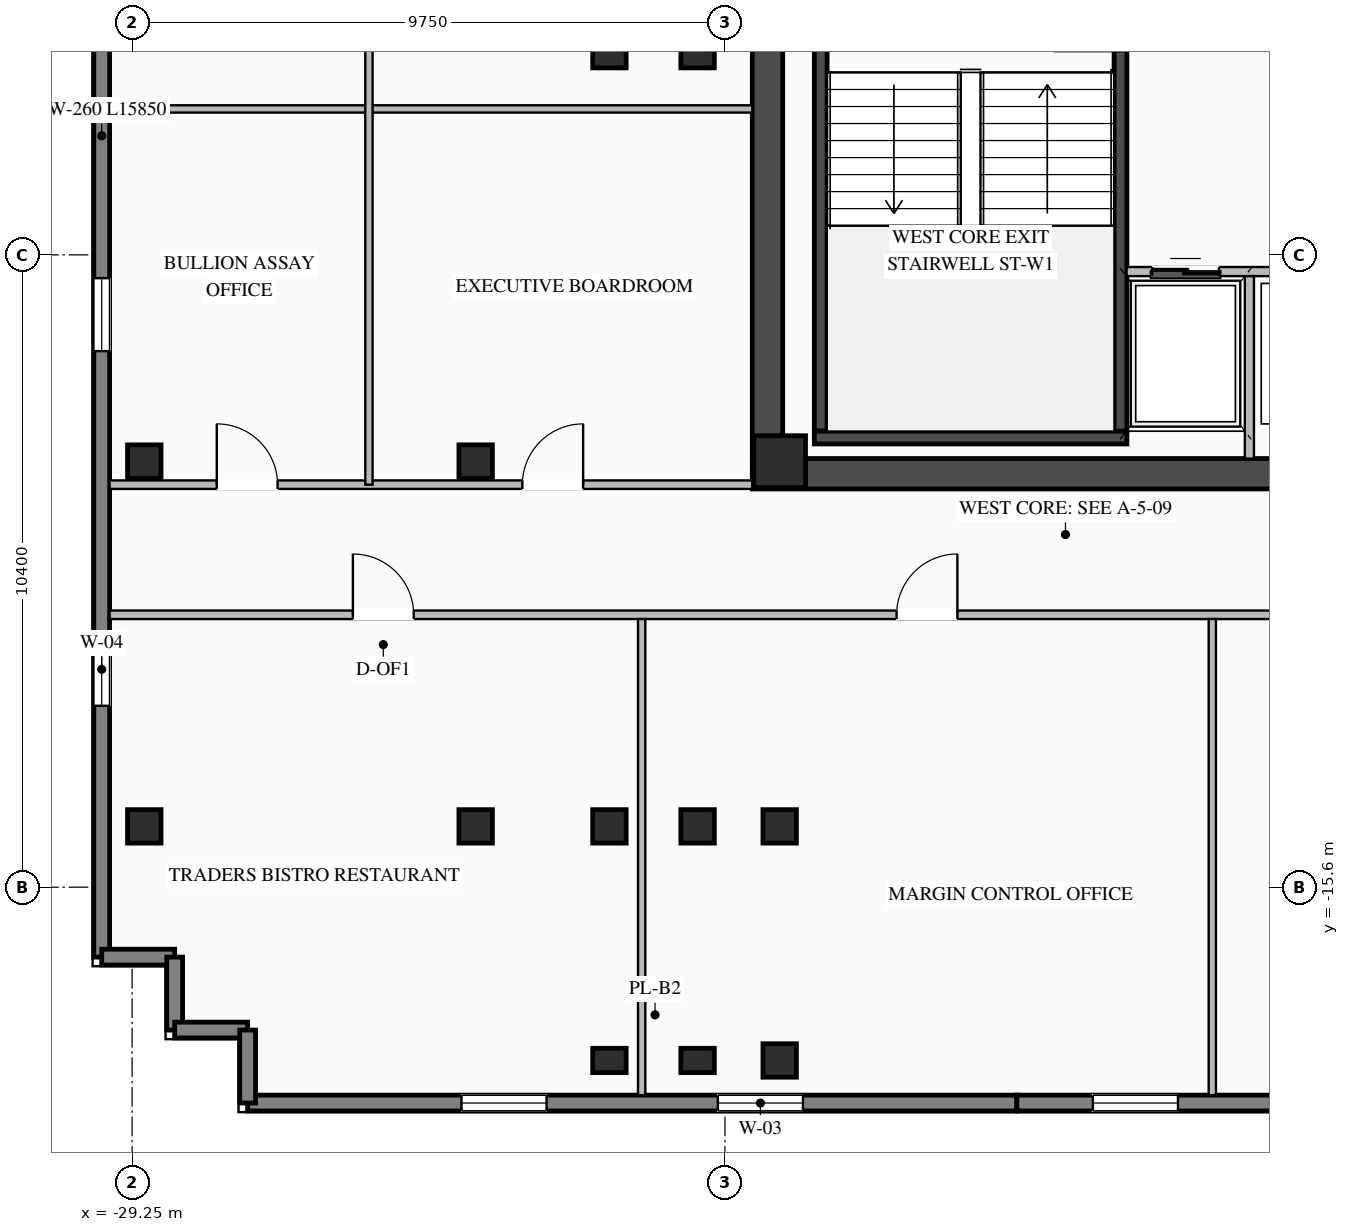
"""IFC4 building model, lengths in metres.
Left out: names, types, materials, properties, quantities, classifications, styles, units other than length and angle.
Written with IfcOpenShell. Run it as: python <this file> out.ifc"""

import sys

from ifc_helpers import new_model, si_unit, direction, frame, frame_2d, origin, origin_2d, place, context, subcontext, project, spatial, rectangle, i_section, extrude, element, fill, save


model = new_model("IFC4")
c1 = context("Model", 3, precision=1e-05, world=origin(), true_north=direction((0.0, 1.0)))
c2 = subcontext(c1, "Body", "Model", "MODEL_VIEW")
j1 = project(units=[si_unit("LENGTHUNIT", "METRE"), si_unit("PLANEANGLEUNIT", "RADIAN")], contexts=[c1])
p1 = place(None, origin())
s1 = spatial("IfcSite", under=j1, at=p1, CompositionType="ELEMENT")
p2 = place(p1, origin())
s2 = spatial("IfcBuilding", under=s1, at=p2, CompositionType="ELEMENT")
p3 = place(p2, frame((0.0, 0.0, 218.85)))
s3 = spatial("IfcBuildingStorey", under=s2, at=p3, CompositionType="ELEMENT", Elevation=218.85)
p4 = place(p3, frame((-19.05, -8.8, 0.0), z_axis=(0.0, 0.0, 1.0), x_axis=(1.0, 0.0, 0.0)))
e1 = element("IfcWall", 1, at=p4, inside=s3, PredefinedType="SHEAR", context=c2, shape_type="SweptSolid", body=[
    extrude(rectangle(XDim=10.25, YDim=0.5, at=frame_2d((5.125, 0.0))), origin(), (0.0, 0.0, 1.0), 3.27),
])
p5 = place(p3, frame((-18.8, -8.55, 0.0), z_axis=(0.0, 0.0, 1.0), x_axis=(0.0, 1.0, 0.0)))
e2 = element("IfcWall", 2, at=p5, inside=s3, PredefinedType="SHEAR", context=c2, shape_type="SweptSolid", body=[
    extrude(rectangle(XDim=17.1, YDim=0.5, at=frame_2d((8.55, 0.0))), origin(), (0.0, 0.0, 1.0), 3.27),
])
p6 = place(p3, frame((-12.995, -8.1, 0.0), z_axis=(0.0, 0.0, 1.0), x_axis=(0.0, 1.0, 0.0)))
e3 = element("IfcWall", 3, at=p6, inside=s3, PredefinedType="SHEAR", context=c2, shape_type="SweptSolid", body=[
    extrude(rectangle(XDim=8.2, YDim=0.21, at=frame_2d((4.1, 0.0))), origin(), (0.0, 0.0, 1.0), 3.27),
])
p7 = place(p6, frame((6.25, 0.0, 0.0)))
e4 = element("IfcOpeningElement", 4, at=p7, cuts=e3, PredefinedType="OPENING", context=c2, shape_type="SweptSolid", body=[
    extrude(rectangle(XDim=1.1, YDim=2.15, at=frame_2d((0.55, 1.075))), frame((0.0, 0.115, 0.0), z_axis=(0.0, -1.0, 0.0), x_axis=(1.0, 0.0, 0.0)), (0.0, 0.0, 1.0), 0.23),
])
p8 = place(p3, frame((-17.925, -8.1, 0.0), z_axis=(0.0, 0.0, 1.0), x_axis=(0.0, 1.0, 0.0)))
e5 = element("IfcWall", 5, at=p8, inside=s3, PredefinedType="SHEAR", context=c2, shape_type="SweptSolid", body=[
    extrude(rectangle(XDim=8.2, YDim=0.21, at=frame_2d((4.1, 0.0))), origin(), (0.0, 0.0, 1.0), 3.27),
])
p9 = place(p3, frame((-18.03, -8.205, 0.0), z_axis=(0.0, 0.0, 1.0), x_axis=(1.0, 0.0, 0.0)))
e6 = element("IfcWall", 6, at=p9, inside=s3, PredefinedType="SHEAR", context=c2, shape_type="SweptSolid", body=[
    extrude(rectangle(XDim=5.14, YDim=0.21, at=frame_2d((2.57, 0.0))), origin(), (0.0, 0.0, 1.0), 3.27),
])
p10 = place(p3, frame((-18.6, -8.6, 0.0), z_axis=(0.0, 0.0, 1.0), x_axis=(1.0, 0.0, 0.0)))
e7 = element("IfcColumn", 7, at=p10, inside=s3, PredefinedType="COLUMN", context=c2, shape_type="SweptSolid", body=[
    extrude(rectangle(XDim=0.85, YDim=0.85, at=origin_2d()), origin(), (0.0, 0.0, 1.0), 3.45),
])
for number, where, z_axis, x_axis in (
    (8, (-21.4, -14.6, 0.0), (0.0, 0.0, 1.0), (1.0, 0.0, 0.0)),
    (9, (-19.95, -14.6, 0.0), (0.0, 0.0, 1.0), (1.0, 0.0, 0.0)),
    (10, (-18.6, -14.6, 0.0), (0.0, 0.0, 1.0), (1.0, 0.0, 0.0)),
    (11, (-21.4, -1.85, 0.0), (0.0, 0.0, 1.0), (1.0, 0.0, 0.0)),
    (12, (-19.95, -1.85, 0.0), (0.0, 0.0, 1.0), (1.0, 0.0, 0.0)),
    (13, (-23.6, -14.6, 0.0), (0.0, 0.0, 1.0), (1.0, 0.0, 0.0)),
    (14, (-23.6, -8.6, 0.0), (0.0, 0.0, 1.0), (1.0, 0.0, 0.0)),
    (15, (-18.6, -18.45, 0.0), (0.0, 0.0, 1.0), (1.0, 0.0, 0.0)),
    (16, (-29.05, -14.6, 0.0), (0.0, 0.0, 1.0), (1.0, 0.0, 0.0)),
    (17, (-29.05, -8.6, 0.0), (0.0, 0.0, 1.0), (1.0, 0.0, 0.0)),
):
    element("IfcColumn", number, at=place(p3, frame(where, z_axis=z_axis, x_axis=x_axis)), inside=s3, PredefinedType="COLUMN", context=c2, shape_type="SweptSolid", body=[
        extrude(i_section(OverallWidth=0.55, OverallDepth=0.55, WebThickness=0.024, FlangeThickness=0.036, at=origin_2d()), origin(), (0.0, 0.0, 1.0), 3.45),
    ])
for number, where, z_axis, x_axis in (
    (18, (-21.4, -18.45, 0.0), (0.0, 0.0, 1.0), (1.0, 0.0, 0.0)),
    (19, (-19.95, -18.45, 0.0), (0.0, 0.0, 1.0), (1.0, 0.0, 0.0)),
):
    element("IfcColumn", number, at=place(p3, frame(where, z_axis=z_axis, x_axis=x_axis)), inside=s3, PredefinedType="PILASTER", context=c2, shape_type="SweptSolid", body=[
        extrude(rectangle(XDim=0.55, YDim=0.4, at=origin_2d()), origin(), (0.0, 0.0, 1.0), 3.45),
    ])
p11 = place(p3, frame((-14.7, -19.15, 0.0), z_axis=(0.0, 0.0, 1.0), x_axis=(-1.0, 0.0, 0.0)))
e20 = element("IfcWall", 20, at=p11, inside=s3, PredefinedType="STANDARD", context=c2, shape_type="SweptSolid", body=[
    extrude(rectangle(XDim=12.65, YDim=0.26, at=frame_2d((6.325, 0.0))), origin(), (0.0, 0.0, 1.0), 3.25),
])
p12 = place(p11, frame((3.517, 0.0, 0.76)))
e21 = element("IfcOpeningElement", 21, at=p12, cuts=e20, PredefinedType="OPENING", context=c2, shape_type="SweptSolid", body=[
    extrude(rectangle(XDim=1.4, YDim=1.95, at=frame_2d((0.7, 0.975))), frame((0.0, 0.14, 0.0), z_axis=(0.0, -1.0, 0.0), x_axis=(1.0, 0.0, 0.0)), (0.0, 0.0, 1.0), 0.28),
])
p13 = place(p11, frame((7.733, 0.0, 0.76)))
e22 = element("IfcOpeningElement", 22, at=p13, cuts=e20, PredefinedType="OPENING", context=c2, shape_type="SweptSolid", body=[
    extrude(rectangle(XDim=1.4, YDim=1.95, at=frame_2d((0.7, 0.975))), frame((0.0, 0.14, 0.0), z_axis=(0.0, -1.0, 0.0), x_axis=(1.0, 0.0, 0.0)), (0.0, 0.0, 1.0), 0.28),
])
p14 = place(p3, frame((-5.7, -19.15, 0.0), z_axis=(0.0, 0.0, 1.0), x_axis=(-1.0, 0.0, 0.0)))
e23 = element("IfcWall", 23, at=p14, inside=s3, PredefinedType="STANDARD", context=c2, shape_type="SweptSolid", body=[
    extrude(rectangle(XDim=9.0, YDim=0.26, at=frame_2d((4.5, 0.0))), origin(), (0.0, 0.0, 1.0), 3.25),
])
p15 = place(p14, frame((2.3, 0.0, 0.76)))
e24 = element("IfcOpeningElement", 24, at=p15, cuts=e23, PredefinedType="OPENING", context=c2, shape_type="SweptSolid", body=[
    extrude(rectangle(XDim=1.4, YDim=1.95, at=frame_2d((0.7, 0.975))), frame((0.0, 0.14, 0.0), z_axis=(0.0, -1.0, 0.0), x_axis=(1.0, 0.0, 0.0)), (0.0, 0.0, 1.0), 0.28),
])
p16 = place(p14, frame((6.35, 0.0, 0.76)))
e25 = element("IfcOpeningElement", 25, at=p16, cuts=e23, PredefinedType="OPENING", context=c2, shape_type="SweptSolid", body=[
    extrude(rectangle(XDim=1.4, YDim=1.95, at=frame_2d((0.7, 0.975))), frame((0.0, 0.14, 0.0), z_axis=(0.0, -1.0, 0.0), x_axis=(1.0, 0.0, 0.0)), (0.0, 0.0, 1.0), 0.28),
])
p17 = place(p3, frame((-29.75, -16.75, 0.0), z_axis=(0.0, 0.0, 1.0), x_axis=(0.0, 1.0, 0.0)))
e26 = element("IfcWall", 26, at=p17, inside=s3, PredefinedType="STANDARD", context=c2, shape_type="SweptSolid", body=[
    extrude(rectangle(XDim=15.85, YDim=0.26, at=frame_2d((7.925, 0.0))), origin(), (0.0, 0.0, 1.0), 3.25),
])
p18 = place(p17, frame((4.133, 0.0, 0.76)))
e27 = element("IfcOpeningElement", 27, at=p18, cuts=e26, PredefinedType="OPENING", context=c2, shape_type="SweptSolid", body=[
    extrude(rectangle(XDim=1.2, YDim=1.95, at=frame_2d((0.6, 0.975))), frame((0.0, 0.14, 0.0), z_axis=(0.0, -1.0, 0.0), x_axis=(1.0, 0.0, 0.0)), (0.0, 0.0, 1.0), 0.28),
])
p19 = place(p17, frame((9.967, 0.0, 0.76)))
e28 = element("IfcOpeningElement", 28, at=p19, cuts=e26, PredefinedType="OPENING", context=c2, shape_type="SweptSolid", body=[
    extrude(rectangle(XDim=1.2, YDim=1.95, at=frame_2d((0.6, 0.975))), frame((0.0, 0.14, 0.0), z_axis=(0.0, -1.0, 0.0), x_axis=(1.0, 0.0, 0.0)), (0.0, 0.0, 1.0), 0.28),
])
for number, where, z_axis, x_axis in (
    (29, (-29.75, -16.75, 0.0), (0.0, 0.0, 1.0), (1.0, 0.0, 0.0)),
    (30, (-28.55, -16.75, 0.0), (0.0, 0.0, 1.0), (0.0, -1.0, 0.0)),
    (31, (-28.55, -17.95, 0.0), (0.0, 0.0, 1.0), (1.0, 0.0, 0.0)),
    (32, (-27.35, -17.95, 0.0), (0.0, 0.0, 1.0), (0.0, -1.0, 0.0)),
):
    element("IfcWall", number, at=place(p3, frame(where, z_axis=z_axis, x_axis=x_axis)), inside=s3, PredefinedType="STANDARD", context=c2, shape_type="SweptSolid", body=[
        extrude(rectangle(XDim=1.2, YDim=0.26, at=frame_2d((0.6, 0.0))), origin(), (0.0, 0.0, 1.0), 3.25),
    ])
p20 = place(p3, frame((-12.895, -5.475, 0.0), z_axis=(0.0, 0.0, 1.0), x_axis=(1.0, 0.0, 0.0)))
e33 = element("IfcWall", 33, at=p20, inside=s3, PredefinedType="STANDARD", context=c2, shape_type="SweptSolid", body=[
    extrude(rectangle(XDim=3.595, YDim=0.15, at=frame_2d((1.797, 0.0))), origin(), (0.0, 0.0, 1.0), 3.25),
])
p21 = place(p20, frame((0.42, 0.0, 0.0)))
e34 = element("IfcOpeningElement", 34, at=p21, cuts=e33, PredefinedType="OPENING", context=c2, shape_type="SweptSolid", body=[
    extrude(rectangle(XDim=1.1, YDim=2.15, at=frame_2d((0.55, 1.075))), frame((0.0, 0.085, 0.0), z_axis=(0.0, -1.0, 0.0), x_axis=(1.0, 0.0, 0.0)), (0.0, 0.0, 1.0), 0.17),
])
p22 = place(p20, frame((2.37, 0.0, 0.0)))
e35 = element("IfcOpeningElement", 35, at=p22, cuts=e33, PredefinedType="OPENING", context=c2, shape_type="SweptSolid", body=[
    extrude(rectangle(XDim=0.75, YDim=2.05, at=frame_2d((0.375, 1.025))), frame((0.0, 0.085, 0.0), z_axis=(0.0, -1.0, 0.0), x_axis=(1.0, 0.0, 0.0)), (0.0, 0.0, 1.0), 0.17),
])
p23 = place(p3, frame((-10.875, -8.55, 0.0), z_axis=(0.0, 0.0, 1.0), x_axis=(0.0, 1.0, 0.0)))
e36 = element("IfcWall", 36, at=p23, inside=s3, PredefinedType="STANDARD", context=c2, shape_type="SweptSolid", body=[
    extrude(rectangle(XDim=3.0, YDim=0.15, at=frame_2d((1.5, 0.0))), origin(), (0.0, 0.0, 1.0), 3.25),
])
p24 = place(p3, frame((-29.62, -11.12, 0.0), z_axis=(0.0, 0.0, 1.0), x_axis=(1.0, 0.0, 0.0)))
e37 = element("IfcWall", 37, at=p24, inside=s3, PredefinedType="STANDARD", context=c2, shape_type="SweptSolid", body=[
    extrude(rectangle(XDim=56.84, YDim=0.14, at=frame_2d((28.42, 0.0))), origin(), (0.0, 0.0, 1.0), 3.25),
])
p25 = place(p24, frame((36.11, 0.0, 0.0)))
e38 = element("IfcOpeningElement", 38, at=p25, cuts=e37, PredefinedType="OPENING", context=c2, shape_type="SweptSolid", body=[
    extrude(rectangle(XDim=0.92, YDim=2.08, at=frame_2d((0.46, 1.04))), frame((0.0, 0.08, 0.0), z_axis=(0.0, -1.0, 0.0), x_axis=(1.0, 0.0, 0.0)), (0.0, 0.0, 1.0), 0.16),
])
p26 = place(p24, frame((39.61, 0.0, 0.0)))
e39 = element("IfcOpeningElement", 39, at=p26, cuts=e37, PredefinedType="OPENING", context=c2, shape_type="SweptSolid", body=[
    extrude(rectangle(XDim=0.92, YDim=2.08, at=frame_2d((0.46, 1.04))), frame((0.0, 0.08, 0.0), z_axis=(0.0, -1.0, 0.0), x_axis=(1.0, 0.0, 0.0)), (0.0, 0.0, 1.0), 0.16),
])
p27 = place(p24, frame((42.46, 0.0, 0.0)))
e40 = element("IfcOpeningElement", 40, at=p27, cuts=e37, PredefinedType="OPENING", context=c2, shape_type="SweptSolid", body=[
    extrude(rectangle(XDim=0.92, YDim=2.08, at=frame_2d((0.46, 1.04))), frame((0.0, 0.08, 0.0), z_axis=(0.0, -1.0, 0.0), x_axis=(1.0, 0.0, 0.0)), (0.0, 0.0, 1.0), 0.16),
])
p28 = place(p24, frame((4.001, 0.0, 0.0)))
e41 = element("IfcOpeningElement", 41, at=p28, cuts=e37, PredefinedType="OPENING", context=c2, shape_type="SweptSolid", body=[
    extrude(rectangle(XDim=1.0, YDim=2.08, at=frame_2d((0.5, 1.04))), frame((0.0, 0.08, 0.0), z_axis=(0.0, -1.0, 0.0), x_axis=(1.0, 0.0, 0.0)), (0.0, 0.0, 1.0), 0.16),
])
p29 = place(p24, frame((12.942, 0.0, 0.0)))
e42 = element("IfcOpeningElement", 42, at=p29, cuts=e37, PredefinedType="OPENING", context=c2, shape_type="SweptSolid", body=[
    extrude(rectangle(XDim=1.0, YDim=2.08, at=frame_2d((0.5, 1.04))), frame((0.0, 0.08, 0.0), z_axis=(0.0, -1.0, 0.0), x_axis=(1.0, 0.0, 0.0)), (0.0, 0.0, 1.0), 0.16),
])
p30 = place(p24, frame((22.154, 0.0, 0.0)))
e43 = element("IfcOpeningElement", 43, at=p30, cuts=e37, PredefinedType="OPENING", context=c2, shape_type="SweptSolid", body=[
    extrude(rectangle(XDim=1.0, YDim=2.08, at=frame_2d((0.5, 1.04))), frame((0.0, 0.08, 0.0), z_axis=(0.0, -1.0, 0.0), x_axis=(1.0, 0.0, 0.0)), (0.0, 0.0, 1.0), 0.16),
])
p31 = place(p24, frame((30.497, 0.0, 0.0)))
e44 = element("IfcOpeningElement", 44, at=p31, cuts=e37, PredefinedType="OPENING", context=c2, shape_type="SweptSolid", body=[
    extrude(rectangle(XDim=1.0, YDim=2.08, at=frame_2d((0.5, 1.04))), frame((0.0, 0.08, 0.0), z_axis=(0.0, -1.0, 0.0), x_axis=(1.0, 0.0, 0.0)), (0.0, 0.0, 1.0), 0.16),
])
p32 = place(p24, frame((46.837, 0.0, 0.0)))
e45 = element("IfcOpeningElement", 45, at=p32, cuts=e37, PredefinedType="OPENING", context=c2, shape_type="SweptSolid", body=[
    extrude(rectangle(XDim=1.0, YDim=2.08, at=frame_2d((0.5, 1.04))), frame((0.0, 0.08, 0.0), z_axis=(0.0, -1.0, 0.0), x_axis=(1.0, 0.0, 0.0)), (0.0, 0.0, 1.0), 0.16),
])
p33 = place(p24, frame((53.122, 0.0, 0.0)))
e46 = element("IfcOpeningElement", 46, at=p33, cuts=e37, PredefinedType="OPENING", context=c2, shape_type="SweptSolid", body=[
    extrude(rectangle(XDim=1.0, YDim=2.08, at=frame_2d((0.5, 1.04))), frame((0.0, 0.08, 0.0), z_axis=(0.0, -1.0, 0.0), x_axis=(1.0, 0.0, 0.0)), (0.0, 0.0, 1.0), 0.16),
])
for number, where, z_axis, x_axis in (
    (47, (-20.87, -19.02, 0.0), (0.0, 0.0, 1.0), (0.0, 1.0, 0.0)),
    (48, (-11.485, -19.02, 0.0), (0.0, 0.0, 1.0), (0.0, 1.0, 0.0)),
):
    element("IfcWall", number, at=place(p3, frame(where, z_axis=z_axis, x_axis=x_axis)), inside=s3, PredefinedType="STANDARD", context=c2, shape_type="SweptSolid", body=[
        extrude(rectangle(XDim=7.83, YDim=0.12, at=frame_2d((3.915, 0.0))), origin(), (0.0, 0.0, 1.0), 3.25),
    ])
p34 = place(p3, frame((-29.62, -8.98, 0.0), z_axis=(0.0, 0.0, 1.0), x_axis=(1.0, 0.0, 0.0)))
e49 = element("IfcWall", 49, at=p34, inside=s3, PredefinedType="STANDARD", context=c2, shape_type="SweptSolid", body=[
    extrude(rectangle(XDim=10.57, YDim=0.14, at=frame_2d((5.285, 0.0))), origin(), (0.0, 0.0, 1.0), 3.25),
])
p35 = place(p34, frame((1.762, 0.0, 0.0)))
e50 = element("IfcOpeningElement", 50, at=p35, cuts=e49, PredefinedType="OPENING", context=c2, shape_type="SweptSolid", body=[
    extrude(rectangle(XDim=1.0, YDim=2.08, at=frame_2d((0.5, 1.04))), frame((0.0, 0.08, 0.0), z_axis=(0.0, -1.0, 0.0), x_axis=(1.0, 0.0, 0.0)), (0.0, 0.0, 1.0), 0.16),
])
p36 = place(p34, frame((6.788, 0.0, 0.0)))
e51 = element("IfcOpeningElement", 51, at=p36, cuts=e49, PredefinedType="OPENING", context=c2, shape_type="SweptSolid", body=[
    extrude(rectangle(XDim=1.0, YDim=2.08, at=frame_2d((0.5, 1.04))), frame((0.0, 0.08, 0.0), z_axis=(0.0, -1.0, 0.0), x_axis=(1.0, 0.0, 0.0)), (0.0, 0.0, 1.0), 0.16),
])
p37 = place(p3, frame((-29.62, -2.8, 0.0), z_axis=(0.0, 0.0, 1.0), x_axis=(1.0, 0.0, 0.0)))
e52 = element("IfcWall", 52, at=p37, inside=s3, PredefinedType="STANDARD", context=c2, shape_type="SweptSolid", body=[
    extrude(rectangle(XDim=10.57, YDim=0.12, at=frame_2d((5.285, 0.0))), origin(), (0.0, 0.0, 1.0), 3.25),
])
p38 = place(p3, frame((-25.355, -8.98, 0.0), z_axis=(0.0, 0.0, 1.0), x_axis=(0.0, 1.0, 0.0)))
e53 = element("IfcWall", 53, at=p38, inside=s3, PredefinedType="STANDARD", context=c2, shape_type="SweptSolid", body=[
    extrude(rectangle(XDim=17.96, YDim=0.12, at=frame_2d((8.98, 0.0))), origin(), (0.0, 0.0, 1.0), 3.25),
])
p39 = place(p12, origin())
e54 = element("IfcWindow", 54, at=p39, inside=s3, PartitioningType="SINGLE_PANEL", PredefinedType="WINDOW", context=c2, shape_type="SweptSolid", body=[
    extrude(rectangle(XDim=1.4, YDim=1.95, at=frame_2d((0.7, 0.975))), frame((0.0, 0.03, 0.0), z_axis=(0.0, -1.0, 0.0), x_axis=(1.0, 0.0, 0.0)), (0.0, 0.0, 1.0), 0.06),
])
fill(e21, e54)
p40 = place(p13, origin())
e55 = element("IfcWindow", 55, at=p40, inside=s3, PartitioningType="SINGLE_PANEL", PredefinedType="WINDOW", context=c2, shape_type="SweptSolid", body=[
    extrude(rectangle(XDim=1.4, YDim=1.95, at=frame_2d((0.7, 0.975))), frame((0.0, 0.03, 0.0), z_axis=(0.0, -1.0, 0.0), x_axis=(1.0, 0.0, 0.0)), (0.0, 0.0, 1.0), 0.06),
])
fill(e22, e55)
p41 = place(p16, origin())
e56 = element("IfcWindow", 56, at=p41, inside=s3, PartitioningType="SINGLE_PANEL", PredefinedType="WINDOW", context=c2, shape_type="SweptSolid", body=[
    extrude(rectangle(XDim=1.4, YDim=1.95, at=frame_2d((0.7, 0.975))), frame((0.0, 0.03, 0.0), z_axis=(0.0, -1.0, 0.0), x_axis=(1.0, 0.0, 0.0)), (0.0, 0.0, 1.0), 0.06),
])
fill(e25, e56)
p42 = place(p18, origin())
e57 = element("IfcWindow", 57, at=p42, inside=s3, PartitioningType="SINGLE_PANEL", PredefinedType="WINDOW", context=c2, shape_type="SweptSolid", body=[
    extrude(rectangle(XDim=1.2, YDim=1.95, at=frame_2d((0.6, 0.975))), frame((0.0, 0.03, 0.0), z_axis=(0.0, -1.0, 0.0), x_axis=(1.0, 0.0, 0.0)), (0.0, 0.0, 1.0), 0.06),
])
fill(e27, e57)
p43 = place(p19, origin())
e58 = element("IfcWindow", 58, at=p43, inside=s3, PartitioningType="SINGLE_PANEL", PredefinedType="WINDOW", context=c2, shape_type="SweptSolid", body=[
    extrude(rectangle(XDim=1.2, YDim=1.95, at=frame_2d((0.6, 0.975))), frame((0.0, 0.03, 0.0), z_axis=(0.0, -1.0, 0.0), x_axis=(1.0, 0.0, 0.0)), (0.0, 0.0, 1.0), 0.06),
])
fill(e28, e58)
p44 = place(p21, origin())
e59 = element("IfcDoor", 59, at=p44, inside=s3, OperationType="DOUBLE_DOOR_SLIDING", PredefinedType="DOOR", context=c2, shape_type="SweptSolid", body=[
    extrude(rectangle(XDim=1.1, YDim=2.15, at=frame_2d((0.55, 1.075))), frame((0.0, 0.025, 0.0), z_axis=(0.0, -1.0, 0.0), x_axis=(1.0, 0.0, 0.0)), (0.0, 0.0, 1.0), 0.05),
])
fill(e34, e59)
p45 = place(p28, origin())
e60 = element("IfcDoor", 60, at=p45, inside=s3, OperationType="SINGLE_SWING_LEFT", PredefinedType="DOOR", context=c2, shape_type="SweptSolid", body=[
    extrude(rectangle(XDim=1.0, YDim=2.08, at=frame_2d((0.5, 1.04))), frame((0.0, 0.025, 0.0), z_axis=(0.0, -1.0, 0.0), x_axis=(1.0, 0.0, 0.0)), (0.0, 0.0, 1.0), 0.05),
])
fill(e41, e60)
p46 = place(p29, origin())
e61 = element("IfcDoor", 61, at=p46, inside=s3, OperationType="SINGLE_SWING_RIGHT", PredefinedType="DOOR", context=c2, shape_type="SweptSolid", body=[
    extrude(rectangle(XDim=1.0, YDim=2.08, at=frame_2d((0.5, 1.04))), frame((0.0, 0.025, 0.0), z_axis=(0.0, -1.0, 0.0), x_axis=(1.0, 0.0, 0.0)), (0.0, 0.0, 1.0), 0.05),
])
fill(e42, e61)
p47 = place(p35, origin())
e62 = element("IfcDoor", 62, at=p47, inside=s3, OperationType="SINGLE_SWING_LEFT", PredefinedType="DOOR", context=c2, shape_type="SweptSolid", body=[
    extrude(rectangle(XDim=1.0, YDim=2.08, at=frame_2d((0.5, 1.04))), frame((0.0, 0.025, 0.0), z_axis=(0.0, -1.0, 0.0), x_axis=(1.0, 0.0, 0.0)), (0.0, 0.0, 1.0), 0.05),
])
fill(e50, e62)
p48 = place(p36, origin())
e63 = element("IfcDoor", 63, at=p48, inside=s3, OperationType="SINGLE_SWING_RIGHT", PredefinedType="DOOR", context=c2, shape_type="SweptSolid", body=[
    extrude(rectangle(XDim=1.0, YDim=2.08, at=frame_2d((0.5, 1.04))), frame((0.0, 0.025, 0.0), z_axis=(0.0, -1.0, 0.0), x_axis=(1.0, 0.0, 0.0)), (0.0, 0.0, 1.0), 0.05),
])
fill(e51, e63)
save(model, sys.argv[1])
